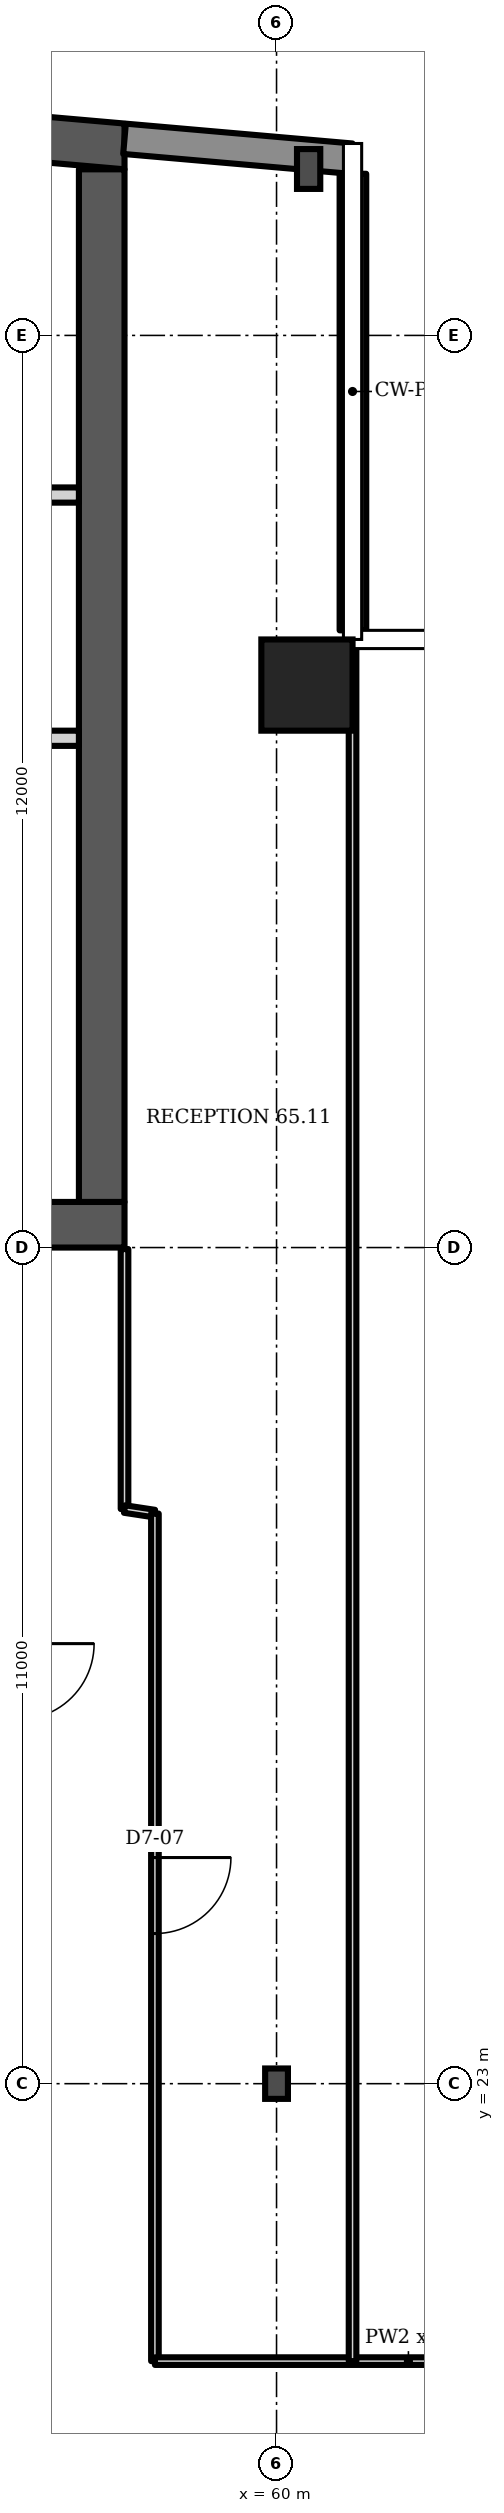
"""IFC4 building model, lengths in metres.
Left out: names, types, materials, properties, quantities, classifications, styles, units other than length and angle.
Written with IfcOpenShell. Run it as: python <this file> out.ifc"""

import sys

from ifc_helpers import new_model, si_unit, direction, frame, frame_2d, origin, origin_2d, place, context, subcontext, project, spatial, polyline, rectangle, i_section, outline, extrude, element, fill, save


model = new_model("IFC4")
c1 = context("Model", 3, precision=1e-05, world=origin(), true_north=direction((0.0, 1.0)))
c2 = subcontext(c1, "Body", "Model", "MODEL_VIEW")
j1 = project(units=[si_unit("LENGTHUNIT", "METRE"), si_unit("PLANEANGLEUNIT", "RADIAN")], contexts=[c1])
p1 = place(None, origin())
s1 = spatial("IfcSite", under=j1, at=p1, CompositionType="ELEMENT")
p2 = place(p1, origin())
s2 = spatial("IfcBuilding", under=s1, at=p2, CompositionType="ELEMENT")
p3 = place(p2, frame((0.0, 0.0, 257.5)))
s3 = spatial("IfcBuildingStorey", under=s2, at=p3, CompositionType="ELEMENT", Elevation=257.5)
p4 = place(p3, origin())
e1 = element("IfcWall", 1, at=p4, inside=s3, PredefinedType="SHEAR", context=c2, shape_type="SweptSolid", body=[
    extrude(outline(polyline([(23.0, 48.185), (40.5, 49.716), (58.0, 48.185), (58.0, 48.787), (40.5, 50.318), (23.0, 48.787), (23.0, 48.185)])), origin(), (0.0, 0.0, 1.0), 3.6),
])
p5 = place(p3, frame((23.0, 34.3, 0.0), z_axis=(0.0, 0.0, 1.0), x_axis=(1.0, 0.0, 0.0)))
e2 = element("IfcWall", 2, at=p5, inside=s3, PredefinedType="SHEAR", context=c2, shape_type="SweptSolid", body=[
    extrude(rectangle(XDim=35.0, YDim=0.6, at=frame_2d((17.5, 0.0))), origin(), (0.0, 0.0, 1.0), 3.6),
])
p6 = place(p5, frame((0.65, 0.0, 0.0)))
e3 = element("IfcOpeningElement", 3, at=p6, cuts=e2, PredefinedType="OPENING", context=c2, shape_type="SweptSolid", body=[
    extrude(rectangle(XDim=1.2, YDim=2.1, at=frame_2d((0.6, 1.05))), frame((0.0, 0.31, 0.0), z_axis=(0.0, -1.0, 0.0), x_axis=(1.0, 0.0, 0.0)), (0.0, 0.0, 1.0), 0.62),
])
p7 = place(p5, frame((7.717, 0.0, 0.0)))
e4 = element("IfcOpeningElement", 4, at=p7, cuts=e2, PredefinedType="OPENING", context=c2, shape_type="SweptSolid", body=[
    extrude(rectangle(XDim=1.1, YDim=2.1, at=frame_2d((0.55, 1.05))), frame((0.0, 0.31, 0.0), z_axis=(0.0, -1.0, 0.0), x_axis=(1.0, 0.0, 0.0)), (0.0, 0.0, 1.0), 0.62),
])
p8 = place(p5, frame((12.183, 0.0, 0.0)))
e5 = element("IfcOpeningElement", 5, at=p8, cuts=e2, PredefinedType="OPENING", context=c2, shape_type="SweptSolid", body=[
    extrude(rectangle(XDim=1.1, YDim=2.1, at=frame_2d((0.55, 1.05))), frame((0.0, 0.31, 0.0), z_axis=(0.0, -1.0, 0.0), x_axis=(1.0, 0.0, 0.0)), (0.0, 0.0, 1.0), 0.62),
])
p9 = place(p5, frame((9.8, 0.0, 0.0)))
e6 = element("IfcOpeningElement", 6, at=p9, cuts=e2, PredefinedType="OPENING", context=c2, shape_type="SweptSolid", body=[
    extrude(rectangle(XDim=1.4, YDim=2.1, at=frame_2d((0.7, 1.05))), frame((0.0, 0.31, 0.0), z_axis=(0.0, -1.0, 0.0), x_axis=(1.0, 0.0, 0.0)), (0.0, 0.0, 1.0), 0.62),
])
p10 = place(p5, frame((14.717, 0.0, 0.0)))
e7 = element("IfcOpeningElement", 7, at=p10, cuts=e2, PredefinedType="OPENING", context=c2, shape_type="SweptSolid", body=[
    extrude(rectangle(XDim=1.1, YDim=2.1, at=frame_2d((0.55, 1.05))), frame((0.0, 0.31, 0.0), z_axis=(0.0, -1.0, 0.0), x_axis=(1.0, 0.0, 0.0)), (0.0, 0.0, 1.0), 0.62),
])
p11 = place(p5, frame((16.95, 0.0, 0.0)))
e8 = element("IfcOpeningElement", 8, at=p11, cuts=e2, PredefinedType="OPENING", context=c2, shape_type="SweptSolid", body=[
    extrude(rectangle(XDim=1.1, YDim=2.1, at=frame_2d((0.55, 1.05))), frame((0.0, 0.31, 0.0), z_axis=(0.0, -1.0, 0.0), x_axis=(1.0, 0.0, 0.0)), (0.0, 0.0, 1.0), 0.62),
])
p12 = place(p5, frame((19.183, 0.0, 0.0)))
e9 = element("IfcOpeningElement", 9, at=p12, cuts=e2, PredefinedType="OPENING", context=c2, shape_type="SweptSolid", body=[
    extrude(rectangle(XDim=1.1, YDim=2.1, at=frame_2d((0.55, 1.05))), frame((0.0, 0.31, 0.0), z_axis=(0.0, -1.0, 0.0), x_axis=(1.0, 0.0, 0.0)), (0.0, 0.0, 1.0), 0.62),
])
p13 = place(p5, frame((26.15, 0.0, 0.0)))
e10 = element("IfcOpeningElement", 10, at=p13, cuts=e2, PredefinedType="OPENING", context=c2, shape_type="SweptSolid", body=[
    extrude(rectangle(XDim=1.2, YDim=2.1, at=frame_2d((0.6, 1.05))), frame((0.0, 0.31, 0.0), z_axis=(0.0, -1.0, 0.0), x_axis=(1.0, 0.0, 0.0)), (0.0, 0.0, 1.0), 0.62),
])
p14 = place(p5, frame((30.8, 0.0, 0.0)))
e11 = element("IfcOpeningElement", 11, at=p14, cuts=e2, PredefinedType="OPENING", context=c2, shape_type="SweptSolid", body=[
    extrude(rectangle(XDim=1.4, YDim=2.1, at=frame_2d((0.7, 1.05))), frame((0.0, 0.31, 0.0), z_axis=(0.0, -1.0, 0.0), x_axis=(1.0, 0.0, 0.0)), (0.0, 0.0, 1.0), 0.62),
])
p15 = place(p3, frame((57.7, 34.6, 0.0), z_axis=(0.0, 0.0, 1.0), x_axis=(0.0, 1.0, 0.0)))
e12 = element("IfcWall", 12, at=p15, inside=s3, PredefinedType="SHEAR", context=c2, shape_type="SweptSolid", body=[
    extrude(rectangle(XDim=13.585, YDim=0.6, at=frame_2d((6.792, 0.0))), origin(), (0.0, 0.0, 1.0), 3.6),
])
p16 = place(p3, frame((60.4, 41.4, 0.0), z_axis=(0.0, 0.0, 1.0), x_axis=(1.0, 0.0, 0.0)))
e13 = element("IfcColumn", 13, at=p16, inside=s3, PredefinedType="COLUMN", context=c2, shape_type="SweptSolid", body=[
    extrude(rectangle(XDim=1.2, YDim=1.2, at=origin_2d()), origin(), (0.0, 0.0, 1.0), 3.6),
])
p17 = place(p3, frame((60.422, 48.189, 0.0), z_axis=(0.0, 0.0, 1.0), x_axis=(1.0, 0.0, 0.0)))
e14 = element("IfcColumn", 14, at=p17, inside=s3, PredefinedType="COLUMN", context=c2, shape_type="SweptSolid", body=[
    extrude(i_section(OverallWidth=0.306, OverallDepth=0.524, WebThickness=0.021, FlangeThickness=0.04, FilletRadius=0.027, at=origin_2d()), origin(), (0.0, 0.0, 1.0), 3.6),
])
p18 = place(p3, frame((60.0, 23.0, 0.0), z_axis=(0.0, 0.0, 1.0), x_axis=(1.0, 0.0, 0.0)))
e15 = element("IfcColumn", 15, at=p18, inside=s3, PredefinedType="COLUMN", context=c2, shape_type="SweptSolid", body=[
    extrude(i_section(OverallWidth=0.3, OverallDepth=0.4, WebThickness=0.013, FlangeThickness=0.024, FilletRadius=0.027, at=origin_2d()), origin(), (0.0, 0.0, 1.0), 3.6),
])
p19 = place(p3, frame((60.983, 48.326, 0.0), z_axis=(0.0, 0.0, 1.0), x_axis=(-0.996194, 0.087168, 0.0)))
e16 = element("IfcWall", 16, at=p19, inside=s3, PredefinedType="SOLIDWALL", context=c2, shape_type="SweptSolid", body=[
    extrude(rectangle(XDim=2.994, YDim=0.4, at=frame_2d((1.497, 0.0))), origin(), (0.0, 0.0, 1.0), 3.2),
])
p20 = place(p3, frame((61.005, 42.12, 0.0), z_axis=(0.0, 0.0, 1.0), x_axis=(0.0, 1.0, 0.0)))
e17 = element("IfcWall", 17, at=p20, inside=s3, PredefinedType="SOLIDWALL", context=c2, shape_type="SweptSolid", body=[
    extrude(rectangle(XDim=6.006, YDim=0.35, at=frame_2d((3.003, 0.0))), origin(), (0.0, 0.0, 1.0), 1.0),
])
p21 = place(p3, frame((51.3, 40.7, 0.0), z_axis=(0.0, 0.0, 1.0), x_axis=(1.0, 0.0, 0.0)))
e18 = element("IfcWall", 18, at=p21, inside=s3, PredefinedType="PARTITIONING", context=c2, shape_type="SweptSolid", body=[
    extrude(rectangle(XDim=6.1, YDim=0.2, at=frame_2d((3.05, 0.0))), origin(), (0.0, 0.0, 1.0), 3.2),
])
p22 = place(p21, frame((0.417, 0.0, 0.0)))
e19 = element("IfcOpeningElement", 19, at=p22, cuts=e18, PredefinedType="OPENING", context=c2, shape_type="SweptSolid", body=[
    extrude(rectangle(XDim=1.1, YDim=2.1, at=frame_2d((0.55, 1.05))), frame((0.0, 0.11, 0.0), z_axis=(0.0, -1.0, 0.0), x_axis=(1.0, 0.0, 0.0)), (0.0, 0.0, 1.0), 0.22),
])
p23 = place(p21, frame((3.617, 0.0, 0.0)))
e20 = element("IfcOpeningElement", 20, at=p23, cuts=e18, PredefinedType="OPENING", context=c2, shape_type="SweptSolid", body=[
    extrude(rectangle(XDim=1.0, YDim=2.1, at=frame_2d((0.5, 1.05))), frame((0.0, 0.11, 0.0), z_axis=(0.0, -1.0, 0.0), x_axis=(1.0, 0.0, 0.0)), (0.0, 0.0, 1.0), 0.22),
])
p24 = place(p3, frame((51.3, 43.9, 0.0), z_axis=(0.0, 0.0, 1.0), x_axis=(1.0, 0.0, 0.0)))
e21 = element("IfcWall", 21, at=p24, inside=s3, PredefinedType="PARTITIONING", context=c2, shape_type="SweptSolid", body=[
    extrude(rectangle(XDim=6.1, YDim=0.2, at=frame_2d((3.05, 0.0))), origin(), (0.0, 0.0, 1.0), 3.2),
])
p25 = place(p24, frame((2.383, 0.0, 0.0)))
e22 = element("IfcOpeningElement", 22, at=p25, cuts=e21, PredefinedType="OPENING", context=c2, shape_type="SweptSolid", body=[
    extrude(rectangle(XDim=1.0, YDim=2.1, at=frame_2d((0.5, 1.05))), frame((0.0, 0.11, 0.0), z_axis=(0.0, -1.0, 0.0), x_axis=(1.0, 0.0, 0.0)), (0.0, 0.0, 1.0), 0.22),
])
p26 = place(p24, frame((4.367, 0.0, 0.0)))
e23 = element("IfcOpeningElement", 23, at=p26, cuts=e21, PredefinedType="OPENING", context=c2, shape_type="SweptSolid", body=[
    extrude(rectangle(XDim=1.0, YDim=2.1, at=frame_2d((0.5, 1.05))), frame((0.0, 0.11, 0.0), z_axis=(0.0, -1.0, 0.0), x_axis=(1.0, 0.0, 0.0)), (0.0, 0.0, 1.0), 0.22),
])
p27 = place(p3, frame((58.0, 30.56, 0.0), z_axis=(0.0, 0.0, 1.0), x_axis=(0.0, 1.0, 0.0)))
e24 = element("IfcWall", 24, at=p27, inside=s3, PredefinedType="PARTITIONING", context=c2, shape_type="SweptSolid", body=[
    extrude(rectangle(XDim=3.42, YDim=0.1, at=frame_2d((1.71, 0.0))), origin(), (0.0, 0.0, 1.0), 3.2),
])
p28 = place(p3, frame((58.395, 30.5, 0.0), z_axis=(0.0, 0.0, 1.0), x_axis=(-0.988637, 0.150312, 0.0)))
e25 = element("IfcWall", 25, at=p28, inside=s3, PredefinedType="PARTITIONING", context=c2, shape_type="SweptSolid", body=[
    extrude(rectangle(XDim=0.4, YDim=0.1, at=frame_2d((0.2, 0.0))), origin(), (0.0, 0.0, 1.0), 3.2),
])
p29 = place(p3, frame((58.4, 19.35, 0.0), z_axis=(0.0, 0.0, 1.0), x_axis=(0.0, 1.0, 0.0)))
e26 = element("IfcWall", 26, at=p29, inside=s3, PredefinedType="PARTITIONING", context=c2, shape_type="SweptSolid", body=[
    extrude(rectangle(XDim=11.15, YDim=0.1, at=frame_2d((5.575, 0.0))), origin(), (0.0, 0.0, 1.0), 3.2),
])
p30 = place(p29, frame((5.625, 0.0, 0.0)))
e27 = element("IfcOpeningElement", 27, at=p30, cuts=e26, PredefinedType="OPENING", context=c2, shape_type="SweptSolid", body=[
    extrude(rectangle(XDim=1.0, YDim=2.1, at=frame_2d((0.5, 1.05))), frame((0.0, 0.06, 0.0), z_axis=(0.0, -1.0, 0.0), x_axis=(1.0, 0.0, 0.0)), (0.0, 0.0, 1.0), 0.12),
])
p31 = place(p3, frame((58.4, 19.35, 0.0), z_axis=(0.0, 0.0, 1.0), x_axis=(1.0, 0.0, 0.0)))
e28 = element("IfcWall", 28, at=p31, inside=s3, PredefinedType="PARTITIONING", context=c2, shape_type="SweptSolid", body=[
    extrude(rectangle(XDim=6.67, YDim=0.1, at=frame_2d((3.335, 0.0))), origin(), (0.0, 0.0, 1.0), 3.2),
])
p32 = place(p3, frame((61.0, 19.35, 0.0), z_axis=(0.0, 0.0, 1.0), x_axis=(0.0, 1.0, 0.0)))
e29 = element("IfcWall", 29, at=p32, inside=s3, PredefinedType="PARTITIONING", context=c2, shape_type="SweptSolid", body=[
    extrude(rectangle(XDim=22.63, YDim=0.1, at=frame_2d((11.315, 0.0))), origin(), (0.0, 0.0, 1.0), 3.2),
])
p33 = place(p30, origin())
e30 = element("IfcDoor", 30, at=p33, inside=s3, OperationType="SINGLE_SWING_RIGHT", PredefinedType="DOOR", context=c2, shape_type="SweptSolid", body=[
    extrude(rectangle(XDim=1.0, YDim=2.1, at=frame_2d((0.5, 1.05))), frame((0.0, 0.025, 0.0), z_axis=(0.0, -1.0, 0.0), x_axis=(1.0, 0.0, 0.0)), (0.0, 0.0, 1.0), 0.05),
])
fill(e27, e30)
save(model, sys.argv[1])
